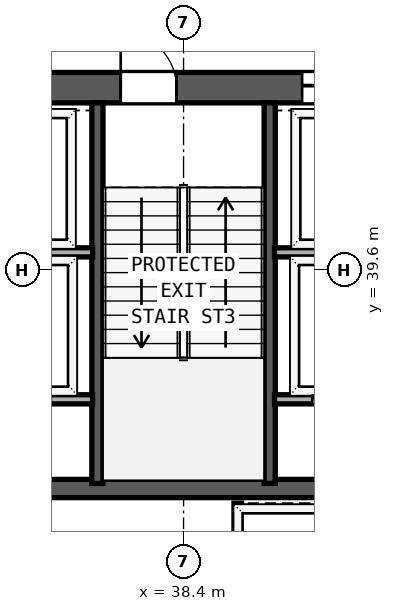
"""IFC4 building model, lengths in metres.
Left out: names, types, materials, properties, quantities, classifications, styles, units other than length and angle.
Written with IfcOpenShell. Run it as: python <this file> out.ifc"""

import sys

from ifc_helpers import new_model, si_unit, direction, frame, frame_2d, origin, place, context, subcontext, project, spatial, rectangle, extrude, element, fill, save


model = new_model("IFC4")
c1 = context("Model", 3, precision=1e-05, world=origin(), true_north=direction((0.0, 1.0)))
c2 = subcontext(c1, "Body", "Model", "MODEL_VIEW")
j1 = project(units=[si_unit("LENGTHUNIT", "METRE"), si_unit("PLANEANGLEUNIT", "RADIAN")], contexts=[c1])
p1 = place(None, origin())
s1 = spatial("IfcSite", under=j1, at=p1, CompositionType="ELEMENT")
p2 = place(p1, origin())
s2 = spatial("IfcBuilding", under=s1, at=p2, CompositionType="ELEMENT")
p3 = place(p2, frame((0.0, 0.0, 164.6)))
s3 = spatial("IfcBuildingStorey", under=s2, at=p3, CompositionType="ELEMENT", Elevation=164.6)
p4 = place(p3, frame((29.7, 43.2, 0.0), z_axis=(0.0, 0.0, 1.0), x_axis=(1.0, 0.0, 0.0)))
e1 = element("IfcWall", 1, at=p4, inside=s3, PredefinedType="SHEAR", context=c2, shape_type="SweptSolid", body=[
    extrude(rectangle(XDim=17.4, YDim=0.6, at=frame_2d((8.7, 0.0))), origin(), (0.0, 0.0, 1.0), 4.22),
])
p5 = place(p4, frame((2.35, 0.0, 0.0)))
e2 = element("IfcOpeningElement", 2, at=p5, cuts=e1, PredefinedType="OPENING", context=c2, shape_type="SweptSolid", body=[
    extrude(rectangle(XDim=1.1, YDim=2.15, at=frame_2d((0.55, 1.075))), frame((0.0, 0.31, 0.0), z_axis=(0.0, -1.0, 0.0), x_axis=(1.0, 0.0, 0.0)), (0.0, 0.0, 1.0), 0.62),
])
p6 = place(p4, frame((7.46, 0.0, 0.0)))
e3 = element("IfcOpeningElement", 3, at=p6, cuts=e1, PredefinedType="OPENING", context=c2, shape_type="SweptSolid", body=[
    extrude(rectangle(XDim=1.1, YDim=2.15, at=frame_2d((0.55, 1.075))), frame((0.0, 0.31, 0.0), z_axis=(0.0, -1.0, 0.0), x_axis=(1.0, 0.0, 0.0)), (0.0, 0.0, 1.0), 0.62),
])
p7 = place(p4, frame((13.55, 0.0, 0.0)))
e4 = element("IfcOpeningElement", 4, at=p7, cuts=e1, PredefinedType="OPENING", context=c2, shape_type="SweptSolid", body=[
    extrude(rectangle(XDim=1.1, YDim=2.15, at=frame_2d((0.55, 1.075))), frame((0.0, 0.31, 0.0), z_axis=(0.0, -1.0, 0.0), x_axis=(1.0, 0.0, 0.0)), (0.0, 0.0, 1.0), 0.62),
])
p8 = place(p4, frame((4.68, 0.0, 0.0)))
e5 = element("IfcOpeningElement", 5, at=p8, cuts=e1, PredefinedType="OPENING", context=c2, shape_type="SweptSolid", body=[
    extrude(rectangle(XDim=1.1, YDim=2.2, at=frame_2d((0.55, 1.1))), frame((0.0, 0.31, 0.0), z_axis=(0.0, -1.0, 0.0), x_axis=(1.0, 0.0, 0.0)), (0.0, 0.0, 1.0), 0.62),
])
p9 = place(p4, frame((11.04, 0.0, 0.0)))
e6 = element("IfcOpeningElement", 6, at=p9, cuts=e1, PredefinedType="OPENING", context=c2, shape_type="SweptSolid", body=[
    extrude(rectangle(XDim=1.1, YDim=2.2, at=frame_2d((0.55, 1.1))), frame((0.0, 0.31, 0.0), z_axis=(0.0, -1.0, 0.0), x_axis=(1.0, 0.0, 0.0)), (0.0, 0.0, 1.0), 0.62),
])
p10 = place(p3, frame((30.3, 35.29, 0.0), z_axis=(0.0, 0.0, 1.0), x_axis=(1.0, 0.0, 0.0)))
e7 = element("IfcWall", 7, at=p10, inside=s3, PredefinedType="SHEAR", context=c2, shape_type="SweptSolid", body=[
    extrude(rectangle(XDim=16.2, YDim=0.36, at=frame_2d((8.1, 0.0))), origin(), (0.0, 0.0, 1.0), 4.22),
])
p11 = place(p10, frame((5.05, 0.0, 0.0), z_axis=(0.0, 0.0, 1.0), x_axis=(-1.0, 0.0, 0.0)))
e8 = element("IfcOpeningElement", 8, at=p11, cuts=e7, PredefinedType="OPENING", context=c2, shape_type="SweptSolid", body=[
    extrude(rectangle(XDim=0.9, YDim=2.1, at=frame_2d((0.45, 1.05))), frame((0.0, 0.19, 0.0), z_axis=(0.0, -1.0, 0.0), x_axis=(1.0, 0.0, 0.0)), (0.0, 0.0, 1.0), 0.38),
])
p12 = place(p10, frame((12.11, 0.0, 0.0), z_axis=(0.0, 0.0, 1.0), x_axis=(-1.0, 0.0, 0.0)))
e9 = element("IfcOpeningElement", 9, at=p12, cuts=e7, PredefinedType="OPENING", context=c2, shape_type="SweptSolid", body=[
    extrude(rectangle(XDim=0.9, YDim=2.1, at=frame_2d((0.45, 1.05))), frame((0.0, 0.19, 0.0), z_axis=(0.0, -1.0, 0.0), x_axis=(1.0, 0.0, 0.0)), (0.0, 0.0, 1.0), 0.38),
])
for number, where, z_axis, x_axis in (
    (10, (36.7, 35.39, 0.0), (0.0, 0.0, 1.0), (0.0, 1.0, 0.0)),
    (11, (40.1, 35.39, 0.0), (0.0, 0.0, 1.0), (0.0, 1.0, 0.0)),
):
    element("IfcWall", number, at=place(p3, frame(where, z_axis=z_axis, x_axis=x_axis)), inside=s3, PredefinedType="SHEAR", context=c2, shape_type="SweptSolid", body=[
        extrude(rectangle(XDim=7.51, YDim=0.22, at=frame_2d((3.755, 0.0))), origin(), (0.0, 0.0, 1.0), 4.22),
    ])
for number, where, z_axis, x_axis in (
    (12, (33.835, 39.95, 0.0), (0.0, 0.0, 1.0), (1.0, 0.0, 0.0)),
    (13, (40.195, 39.95, 0.0), (0.0, 0.0, 1.0), (1.0, 0.0, 0.0)),
):
    element("IfcWall", number, at=place(p3, frame(where, z_axis=z_axis, x_axis=x_axis)), inside=s3, PredefinedType="SOLIDWALL", context=c2, shape_type="SweptSolid", body=[
        extrude(rectangle(XDim=2.77, YDim=0.18, at=frame_2d((1.385, 0.0))), origin(), (0.0, 0.0, 1.0), 4.22),
    ])
p13 = place(p3, frame((33.835, 37.05, 0.0), z_axis=(0.0, 0.0, 1.0), x_axis=(1.0, 0.0, 0.0)))
e14 = element("IfcWall", 14, at=p13, inside=s3, PredefinedType="SOLIDWALL", context=c2, shape_type="SweptSolid", body=[
    extrude(rectangle(XDim=2.77, YDim=0.18, at=frame_2d((1.385, 0.0))), origin(), (0.0, 0.0, 1.0), 4.22),
])
p14 = place(p13, frame((1.945, 0.0, 0.0), z_axis=(0.0, 0.0, 1.0), x_axis=(-1.0, 0.0, 0.0)))
e15 = element("IfcOpeningElement", 15, at=p14, cuts=e14, PredefinedType="OPENING", context=c2, shape_type="SweptSolid", body=[
    extrude(rectangle(XDim=1.2, YDim=2.2, at=frame_2d((0.6, 1.1))), frame((0.0, 0.1, 0.0), z_axis=(0.0, -1.0, 0.0), x_axis=(1.0, 0.0, 0.0)), (0.0, 0.0, 1.0), 0.2),
])
p15 = place(p3, frame((40.195, 37.05, 0.0), z_axis=(0.0, 0.0, 1.0), x_axis=(1.0, 0.0, 0.0)))
e16 = element("IfcWall", 16, at=p15, inside=s3, PredefinedType="SOLIDWALL", context=c2, shape_type="SweptSolid", body=[
    extrude(rectangle(XDim=2.77, YDim=0.18, at=frame_2d((1.385, 0.0))), origin(), (0.0, 0.0, 1.0), 4.22),
])
p16 = place(p15, frame((1.945, 0.0, 0.0), z_axis=(0.0, 0.0, 1.0), x_axis=(-1.0, 0.0, 0.0)))
e17 = element("IfcOpeningElement", 17, at=p16, cuts=e16, PredefinedType="OPENING", context=c2, shape_type="SweptSolid", body=[
    extrude(rectangle(XDim=1.2, YDim=2.2, at=frame_2d((0.6, 1.1))), frame((0.0, 0.1, 0.0), z_axis=(0.0, -1.0, 0.0), x_axis=(1.0, 0.0, 0.0)), (0.0, 0.0, 1.0), 0.2),
])
p17 = place(p3, frame((39.47, 32.95, 0.0), z_axis=(0.0, 0.0, 1.0), x_axis=(0.0, 1.0, 0.0)))
e18 = element("IfcWall", 18, at=p17, inside=s3, PredefinedType="SOLIDWALL", context=c2, shape_type="SweptSolid", body=[
    extrude(rectangle(XDim=2.05, YDim=0.15, at=frame_2d((1.025, 0.0))), origin(), (0.0, 0.0, 1.0), 4.22),
])
p18 = place(p6, origin())
e19 = element("IfcDoor", 19, at=p18, inside=s3, OperationType="SINGLE_SWING_LEFT", PredefinedType="DOOR", context=c2, shape_type="SweptSolid", body=[
    extrude(rectangle(XDim=1.1, YDim=2.15, at=frame_2d((0.55, 1.075))), frame((0.0, 0.185, 0.0), z_axis=(0.0, -1.0, 0.0), x_axis=(1.0, 0.0, 0.0)), (0.0, 0.0, 1.0), 0.05),
])
fill(e3, e19)
p19 = place(p9, origin())
e20 = element("IfcDoor", 20, at=p19, inside=s3, OperationType="SLIDING_TO_LEFT", PredefinedType="DOOR", context=c2, shape_type="SweptSolid", body=[
    extrude(rectangle(XDim=1.1, YDim=2.2, at=frame_2d((0.55, 1.1))), frame((0.0, 0.185, 0.0), z_axis=(0.0, -1.0, 0.0), x_axis=(1.0, 0.0, 0.0)), (0.0, 0.0, 1.0), 0.05),
])
fill(e6, e20)
p20 = place(p16, origin())
e21 = element("IfcDoor", 21, at=p20, inside=s3, OperationType="SLIDING_TO_RIGHT", PredefinedType="DOOR", context=c2, shape_type="SweptSolid", body=[
    extrude(rectangle(XDim=1.2, YDim=2.2, at=frame_2d((0.6, 1.1))), frame((0.0, 0.025, 0.0), z_axis=(0.0, -1.0, 0.0), x_axis=(1.0, 0.0, 0.0)), (0.0, 0.0, 1.0), 0.05),
])
fill(e17, e21)
save(model, sys.argv[1])
